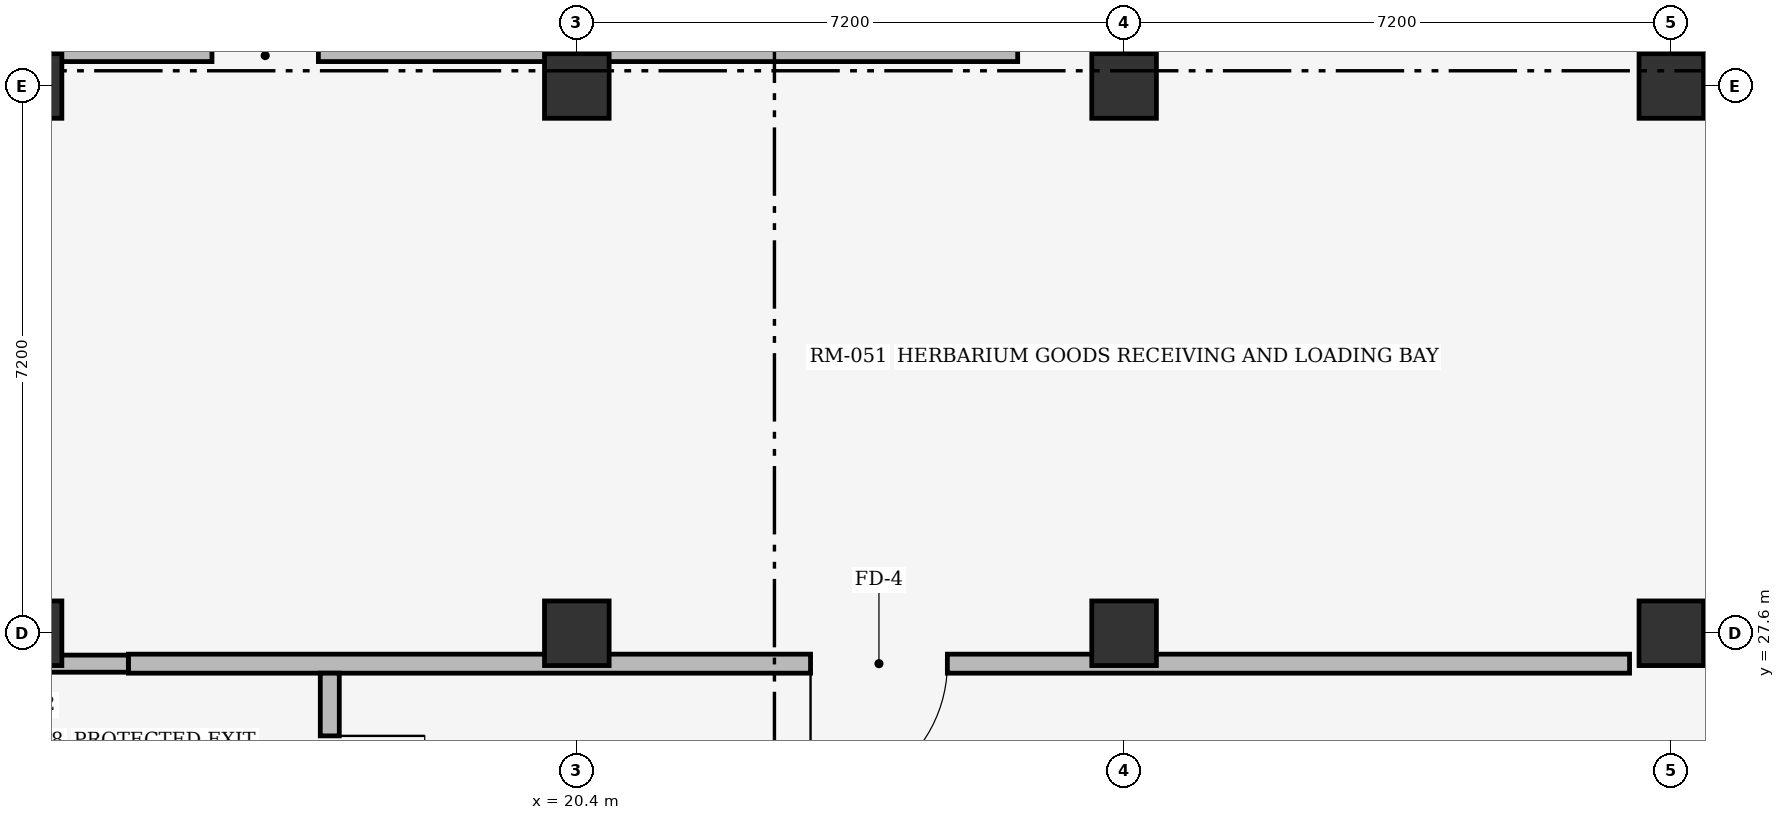
"""IFC4 building model, lengths in metres.
Left out: names, types, materials, properties, quantities, classifications, styles, units other than length and angle.
Written with IfcOpenShell. Run it as: python <this file> out.ifc"""

import sys

from ifc_helpers import new_model, si_unit, direction, frame, frame_2d, origin, origin_2d, place, context, subcontext, project, spatial, rectangle, extrude, element, fill, save


model = new_model("IFC4")
c1 = context("Model", 3, precision=1e-05, world=origin(), true_north=direction((0.0, 1.0)))
c2 = subcontext(c1, "Body", "Model", "MODEL_VIEW")
j1 = project(units=[si_unit("LENGTHUNIT", "METRE"), si_unit("PLANEANGLEUNIT", "RADIAN")], contexts=[c1])
p1 = place(None, origin())
s1 = spatial("IfcSite", under=j1, at=p1, CompositionType="ELEMENT")
p2 = place(p1, origin())
s2 = spatial("IfcBuilding", under=s1, at=p2, CompositionType="ELEMENT")
p3 = place(p2, origin())
s3 = spatial("IfcBuildingStorey", under=s2, at=p3, CompositionType="ELEMENT", Elevation=0.0)
for number, where, z_axis, x_axis in (
    (1, (13.2, 27.6, 0.0), (0.0, 0.0, 1.0), (1.0, 0.0, 0.0)),
    (2, (13.2, 34.8, 0.0), (0.0, 0.0, 1.0), (1.0, 0.0, 0.0)),
    (3, (20.4, 27.6, 0.0), (0.0, 0.0, 1.0), (1.0, 0.0, 0.0)),
    (4, (20.4, 34.8, 0.0), (0.0, 0.0, 1.0), (1.0, 0.0, 0.0)),
    (5, (27.6, 27.6, 0.0), (0.0, 0.0, 1.0), (1.0, 0.0, 0.0)),
    (6, (27.6, 34.8, 0.0), (0.0, 0.0, 1.0), (1.0, 0.0, 0.0)),
    (7, (34.8, 27.6, 0.0), (0.0, 0.0, 1.0), (1.0, 0.0, 0.0)),
    (8, (34.8, 34.8, 0.0), (0.0, 0.0, 1.0), (1.0, 0.0, 0.0)),
):
    element("IfcColumn", number, at=place(p3, frame(where, z_axis=z_axis, x_axis=x_axis)), inside=s3, PredefinedType="COLUMN", context=c2, shape_type="SweptSolid", body=[
        extrude(rectangle(XDim=0.85, YDim=0.85, at=origin_2d()), origin(), (0.0, 0.0, 1.0), 4.48),
    ])
p4 = place(p3, frame((34.8, 35.225, 0.0), z_axis=(0.0, 0.0, 1.0), x_axis=(0.0, 1.0, 0.0)))
e9 = element("IfcWall", 9, at=p4, inside=s3, PredefinedType="STANDARD", context=c2, shape_type="SweptSolid", body=[
    extrude(rectangle(XDim=6.35, YDim=0.38, at=frame_2d((3.175, 0.0))), origin(), (0.0, 0.0, 1.0), 4.8),
])
p5 = place(p4, frame((2.225, 0.0, 0.0)))
e10 = element("IfcOpeningElement", 10, at=p5, cuts=e9, PredefinedType="OPENING", context=c2, shape_type="SweptSolid", body=[
    extrude(rectangle(XDim=1.9, YDim=2.3, at=frame_2d((0.95, 1.15))), frame((0.0, 0.2, 0.0), z_axis=(0.0, -1.0, 0.0), x_axis=(1.0, 0.0, 0.0)), (0.0, 0.0, 1.0), 0.4),
])
p6 = place(p3, frame((35.225, 34.8, 0.0), z_axis=(0.0, 0.0, 1.0), x_axis=(1.0, 0.0, 0.0)))
e11 = element("IfcWall", 11, at=p6, inside=s3, PredefinedType="STANDARD", context=c2, shape_type="SweptSolid", body=[
    extrude(rectangle(XDim=6.35, YDim=0.26, at=frame_2d((3.175, 0.0))), origin(), (0.0, 0.0, 1.0), 3.66),
])
p7 = place(p6, frame((1.375, 0.0, 0.0)))
e12 = element("IfcOpeningElement", 12, at=p7, cuts=e11, PredefinedType="OPENING", context=c2, shape_type="SweptSolid", body=[
    extrude(rectangle(XDim=3.6, YDim=3.8, at=frame_2d((1.8, 1.9))), frame((0.0, 0.14, 0.0), z_axis=(0.0, -1.0, 0.0), x_axis=(1.0, 0.0, 0.0)), (0.0, 0.0, 1.0), 0.28),
])
p8 = place(p3, frame((14.5, 27.2, 0.0), z_axis=(0.0, 0.0, 1.0), x_axis=(1.0, 0.0, 0.0)))
e13 = element("IfcWall", 13, at=p8, inside=s3, PredefinedType="SOLIDWALL", context=c2, shape_type="SweptSolid", body=[
    extrude(rectangle(XDim=19.75, YDim=0.25, at=frame_2d((9.875, 0.0))), origin(), (0.0, 0.0, 1.0), 4.46),
])
p9 = place(p8, frame((8.975, 0.0, 0.0)))
e14 = element("IfcOpeningElement", 14, at=p9, cuts=e13, PredefinedType="OPENING", context=c2, shape_type="SweptSolid", body=[
    extrude(rectangle(XDim=1.8, YDim=2.25, at=frame_2d((0.9, 1.125))), frame((0.0, 0.135, 0.0), z_axis=(0.0, -1.0, 0.0), x_axis=(1.0, 0.0, 0.0)), (0.0, 0.0, 1.0), 0.27),
])
p10 = place(p3, frame((6.4, 27.2, 0.0), z_axis=(0.0, 0.0, 1.0), x_axis=(1.0, 0.0, 0.0)))
e15 = element("IfcWall", 15, at=p10, inside=s3, PredefinedType="SOLIDWALL", context=c2, shape_type="SweptSolid", body=[
    extrude(rectangle(XDim=8.1, YDim=0.225, at=frame_2d((4.05, 0.0))), origin(), (0.0, 0.0, 1.0), 4.46),
])
p11 = place(p10, frame((3.3, 0.0, 0.0)))
e16 = element("IfcOpeningElement", 16, at=p11, cuts=e15, PredefinedType="OPENING", context=c2, shape_type="SweptSolid", body=[
    extrude(rectangle(XDim=1.5, YDim=2.2, at=frame_2d((0.75, 1.1))), frame((0.0, 0.123, 0.0), z_axis=(0.0, -1.0, 0.0), x_axis=(1.0, 0.0, 0.0)), (0.0, 0.0, 1.0), 0.245),
])
p12 = place(p3, frame((6.4, 35.2, 0.0), z_axis=(0.0, 0.0, 1.0), x_axis=(1.0, 0.0, 0.0)))
e17 = element("IfcWall", 17, at=p12, inside=s3, PredefinedType="PARTITIONING", context=c2, shape_type="SweptSolid", body=[
    extrude(rectangle(XDim=19.8, YDim=0.158, at=frame_2d((9.9, 0.0))), origin(), (0.0, 0.0, 1.0), 4.46),
])
p13 = place(p12, frame((9.2, 0.0, 0.0)))
e18 = element("IfcOpeningElement", 18, at=p13, cuts=e17, PredefinedType="OPENING", context=c2, shape_type="SweptSolid", body=[
    extrude(rectangle(XDim=1.4, YDim=2.25, at=frame_2d((0.7, 1.125))), frame((0.0, 0.089, 0.0), z_axis=(0.0, -1.0, 0.0), x_axis=(1.0, 0.0, 0.0)), (0.0, 0.0, 1.0), 0.178),
])
p14 = place(p3, frame((17.15, 17.97, 0.0), z_axis=(0.0, 0.0, 1.0), x_axis=(0.0, 1.0, 0.0)))
e19 = element("IfcWall", 19, at=p14, inside=s3, PredefinedType="SOLIDWALL", context=c2, shape_type="SweptSolid", body=[
    extrude(rectangle(XDim=9.105, YDim=0.25, at=frame_2d((4.552, 0.0))), origin(), (0.0, 0.0, 1.0), 4.46),
])
p15 = place(p14, frame((7.03, 0.0, 0.0)))
e20 = element("IfcOpeningElement", 20, at=p15, cuts=e19, PredefinedType="OPENING", context=c2, shape_type="SweptSolid", body=[
    extrude(rectangle(XDim=1.25, YDim=2.2, at=frame_2d((0.625, 1.1))), frame((0.0, 0.135, 0.0), z_axis=(0.0, -1.0, 0.0), x_axis=(1.0, 0.0, 0.0)), (0.0, 0.0, 1.0), 0.27),
])
p16 = place(p9, frame((1.8, 0.0, 0.0), z_axis=(0.0, 0.0, 1.0), x_axis=(-1.0, 0.0, 0.0)))
e21 = element("IfcDoor", 21, at=p16, inside=s3, OperationType="DOUBLE_DOOR_SINGLE_SWING", PredefinedType="DOOR", context=c2, shape_type="SweptSolid", body=[
    extrude(rectangle(XDim=1.8, YDim=2.25, at=frame_2d((0.9, 1.125))), frame((0.0, 0.025, 0.0), z_axis=(0.0, -1.0, 0.0), x_axis=(1.0, 0.0, 0.0)), (0.0, 0.0, 1.0), 0.05),
])
fill(e14, e21)
p17 = place(p13, origin())
e22 = element("IfcDoor", 22, at=p17, inside=s3, OperationType="SINGLE_SWING_LEFT", PredefinedType="DOOR", context=c2, shape_type="SweptSolid", body=[
    extrude(rectangle(XDim=1.4, YDim=2.25, at=frame_2d((0.7, 1.125))), frame((0.0, 0.025, 0.0), z_axis=(0.0, -1.0, 0.0), x_axis=(1.0, 0.0, 0.0)), (0.0, 0.0, 1.0), 0.05),
])
fill(e18, e22)
p18 = place(p15, origin())
e23 = element("IfcDoor", 23, at=p18, inside=s3, OperationType="SINGLE_SWING_RIGHT", PredefinedType="DOOR", context=c2, shape_type="SweptSolid", body=[
    extrude(rectangle(XDim=1.25, YDim=2.2, at=frame_2d((0.625, 1.1))), frame((0.0, 0.025, 0.0), z_axis=(0.0, -1.0, 0.0), x_axis=(1.0, 0.0, 0.0)), (0.0, 0.0, 1.0), 0.05),
])
fill(e20, e23)
save(model, sys.argv[1])
